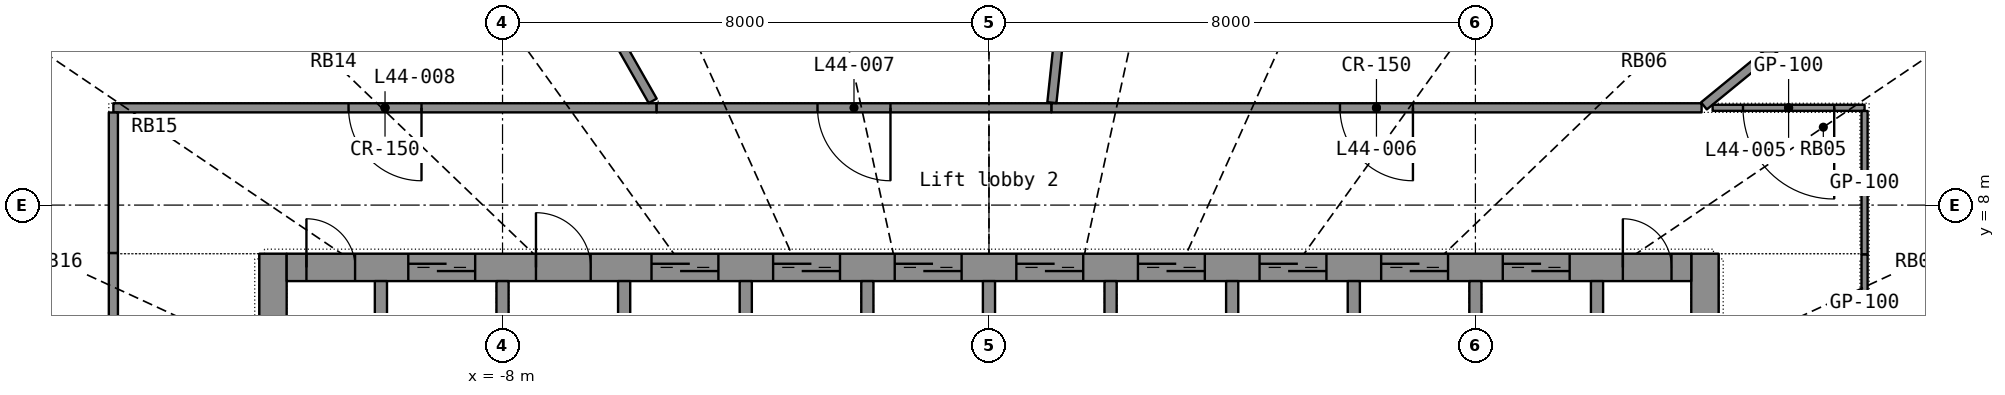
"""IFC4 building model, lengths in metres.
Left out: names, types, materials, properties, quantities, classifications, styles, units other than length and angle.
Written with IfcOpenShell. Run it as: python <this file> out.ifc"""

import sys

from ifc_helpers import new_model, si_unit, direction, frame, frame_2d, origin, place, context, subcontext, project, spatial, rectangle, extrude, element, fill, save


model = new_model("IFC4")
c1 = context("Model", 3, precision=1e-05, world=origin(), true_north=direction((0.0, 1.0)))
c2 = subcontext(c1, "Body", "Model", "MODEL_VIEW")
j1 = project(units=[si_unit("LENGTHUNIT", "METRE"), si_unit("PLANEANGLEUNIT", "RADIAN")], contexts=[c1])
p1 = place(None, origin())
s1 = spatial("IfcSite", under=j1, at=p1, CompositionType="ELEMENT")
p2 = place(p1, origin())
s2 = spatial("IfcBuilding", under=s1, at=p2, CompositionType="ELEMENT")
p3 = place(p2, frame((0.0, 0.0, 183.0)))
s3 = spatial("IfcBuildingStorey", under=s2, at=p3, CompositionType="ELEMENT", Elevation=183.0)
p4 = place(p3, frame((-11.775, -7.2, 0.0), z_axis=(0.0, 0.0, 1.0), x_axis=(0.0, 1.0, 0.0)))
e1 = element("IfcWall", 1, at=p4, inside=s3, PredefinedType="SHEAR", context=c2, shape_type="SweptSolid", body=[
    extrude(rectangle(XDim=14.4, YDim=0.45, at=frame_2d((7.2, 0.0))), origin(), (0.0, 0.0, 1.0), 3.3),
])
p5 = place(p4, frame((6.5, 0.0, 0.0)))
e2 = element("IfcOpeningElement", 2, at=p5, cuts=e1, PredefinedType="OPENING", context=c2, shape_type="SweptSolid", body=[
    extrude(rectangle(XDim=1.4, YDim=2.2, at=frame_2d((0.7, 1.1))), frame((0.0, 0.235, 0.0), z_axis=(0.0, -1.0, 0.0), x_axis=(1.0, 0.0, 0.0)), (0.0, 0.0, 1.0), 0.47),
])
p6 = place(p3, frame((11.775, -7.2, 0.0), z_axis=(0.0, 0.0, 1.0), x_axis=(0.0, 1.0, 0.0)))
e3 = element("IfcWall", 3, at=p6, inside=s3, PredefinedType="SHEAR", context=c2, shape_type="SweptSolid", body=[
    extrude(rectangle(XDim=14.4, YDim=0.45, at=frame_2d((7.2, 0.0))), origin(), (0.0, 0.0, 1.0), 3.3),
])
p7 = place(p6, frame((6.5, 0.0, 0.0)))
e4 = element("IfcOpeningElement", 4, at=p7, cuts=e3, PredefinedType="OPENING", context=c2, shape_type="SweptSolid", body=[
    extrude(rectangle(XDim=1.4, YDim=2.2, at=frame_2d((0.7, 1.1))), frame((0.0, 0.235, 0.0), z_axis=(0.0, -1.0, 0.0), x_axis=(1.0, 0.0, 0.0)), (0.0, 0.0, 1.0), 0.47),
])
p8 = place(p3, frame((-11.55, 6.975, 0.0), z_axis=(0.0, 0.0, 1.0), x_axis=(1.0, 0.0, 0.0)))
e5 = element("IfcWall", 5, at=p8, inside=s3, PredefinedType="SHEAR", context=c2, shape_type="SweptSolid", body=[
    extrude(rectangle(XDim=23.1, YDim=0.45, at=frame_2d((11.55, 0.0))), origin(), (0.0, 0.0, 1.0), 3.3),
])
p9 = place(p8, frame((2.0, 0.0, 0.0)))
e6 = element("IfcOpeningElement", 6, at=p9, cuts=e5, PredefinedType="OPENING", context=c2, shape_type="SweptSolid", body=[
    extrude(rectangle(XDim=1.1, YDim=2.2, at=frame_2d((0.55, 1.1))), frame((0.0, 0.235, 0.0), z_axis=(0.0, -1.0, 0.0), x_axis=(1.0, 0.0, 0.0)), (0.0, 0.0, 1.0), 0.47),
])
p10 = place(p8, frame((6.0, 0.0, 0.0)))
e7 = element("IfcOpeningElement", 7, at=p10, cuts=e5, PredefinedType="OPENING", context=c2, shape_type="SweptSolid", body=[
    extrude(rectangle(XDim=1.1, YDim=2.2, at=frame_2d((0.55, 1.1))), frame((0.0, 0.235, 0.0), z_axis=(0.0, -1.0, 0.0), x_axis=(1.0, 0.0, 0.0)), (0.0, 0.0, 1.0), 0.47),
])
p11 = place(p8, frame((8.0, 0.0, 0.0)))
e8 = element("IfcOpeningElement", 8, at=p11, cuts=e5, PredefinedType="OPENING", context=c2, shape_type="SweptSolid", body=[
    extrude(rectangle(XDim=1.1, YDim=2.2, at=frame_2d((0.55, 1.1))), frame((0.0, 0.235, 0.0), z_axis=(0.0, -1.0, 0.0), x_axis=(1.0, 0.0, 0.0)), (0.0, 0.0, 1.0), 0.47),
])
p12 = place(p8, frame((10.0, 0.0, 0.0)))
e9 = element("IfcOpeningElement", 9, at=p12, cuts=e5, PredefinedType="OPENING", context=c2, shape_type="SweptSolid", body=[
    extrude(rectangle(XDim=1.1, YDim=2.2, at=frame_2d((0.55, 1.1))), frame((0.0, 0.235, 0.0), z_axis=(0.0, -1.0, 0.0), x_axis=(1.0, 0.0, 0.0)), (0.0, 0.0, 1.0), 0.47),
])
p13 = place(p8, frame((12.0, 0.0, 0.0)))
e10 = element("IfcOpeningElement", 10, at=p13, cuts=e5, PredefinedType="OPENING", context=c2, shape_type="SweptSolid", body=[
    extrude(rectangle(XDim=1.1, YDim=2.2, at=frame_2d((0.55, 1.1))), frame((0.0, 0.235, 0.0), z_axis=(0.0, -1.0, 0.0), x_axis=(1.0, 0.0, 0.0)), (0.0, 0.0, 1.0), 0.47),
])
p14 = place(p8, frame((14.0, 0.0, 0.0)))
e11 = element("IfcOpeningElement", 11, at=p14, cuts=e5, PredefinedType="OPENING", context=c2, shape_type="SweptSolid", body=[
    extrude(rectangle(XDim=1.1, YDim=2.2, at=frame_2d((0.55, 1.1))), frame((0.0, 0.235, 0.0), z_axis=(0.0, -1.0, 0.0), x_axis=(1.0, 0.0, 0.0)), (0.0, 0.0, 1.0), 0.47),
])
p15 = place(p8, frame((16.0, 0.0, 0.0)))
e12 = element("IfcOpeningElement", 12, at=p15, cuts=e5, PredefinedType="OPENING", context=c2, shape_type="SweptSolid", body=[
    extrude(rectangle(XDim=1.1, YDim=2.2, at=frame_2d((0.55, 1.1))), frame((0.0, 0.235, 0.0), z_axis=(0.0, -1.0, 0.0), x_axis=(1.0, 0.0, 0.0)), (0.0, 0.0, 1.0), 0.47),
])
p16 = place(p8, frame((18.0, 0.0, 0.0)))
e13 = element("IfcOpeningElement", 13, at=p16, cuts=e5, PredefinedType="OPENING", context=c2, shape_type="SweptSolid", body=[
    extrude(rectangle(XDim=1.1, YDim=2.2, at=frame_2d((0.55, 1.1))), frame((0.0, 0.235, 0.0), z_axis=(0.0, -1.0, 0.0), x_axis=(1.0, 0.0, 0.0)), (0.0, 0.0, 1.0), 0.47),
])
p17 = place(p8, frame((20.0, 0.0, 0.0)))
e14 = element("IfcOpeningElement", 14, at=p17, cuts=e5, PredefinedType="OPENING", context=c2, shape_type="SweptSolid", body=[
    extrude(rectangle(XDim=1.1, YDim=2.2, at=frame_2d((0.55, 1.1))), frame((0.0, 0.235, 0.0), z_axis=(0.0, -1.0, 0.0), x_axis=(1.0, 0.0, 0.0)), (0.0, 0.0, 1.0), 0.47),
])
p18 = place(p8, frame((4.1, 0.0, 0.0)))
e15 = element("IfcOpeningElement", 15, at=p18, cuts=e5, PredefinedType="OPENING", context=c2, shape_type="SweptSolid", body=[
    extrude(rectangle(XDim=0.9, YDim=2.1, at=frame_2d((0.45, 1.05))), frame((0.0, 0.235, 0.0), z_axis=(0.0, -1.0, 0.0), x_axis=(1.0, 0.0, 0.0)), (0.0, 0.0, 1.0), 0.47),
])
p19 = place(p8, frame((0.325, 0.0, 0.0)))
e16 = element("IfcOpeningElement", 16, at=p19, cuts=e5, PredefinedType="OPENING", context=c2, shape_type="SweptSolid", body=[
    extrude(rectangle(XDim=0.8, YDim=2.05, at=frame_2d((0.4, 1.025))), frame((0.0, 0.235, 0.0), z_axis=(0.0, -1.0, 0.0), x_axis=(1.0, 0.0, 0.0)), (0.0, 0.0, 1.0), 0.47),
])
p20 = place(p8, frame((21.975, 0.0, 0.0)))
e17 = element("IfcOpeningElement", 17, at=p20, cuts=e5, PredefinedType="OPENING", context=c2, shape_type="SweptSolid", body=[
    extrude(rectangle(XDim=0.8, YDim=2.05, at=frame_2d((0.4, 1.025))), frame((0.0, 0.235, 0.0), z_axis=(0.0, -1.0, 0.0), x_axis=(1.0, 0.0, 0.0)), (0.0, 0.0, 1.0), 0.47),
])
for number, where, z_axis, x_axis in (
    (18, (-10.0, 3.9, 0.0), (0.0, 0.0, 1.0), (0.0, 1.0, 0.0)),
    (19, (-8.0, 3.9, 0.0), (0.0, 0.0, 1.0), (0.0, 1.0, 0.0)),
    (20, (-6.0, 3.9, 0.0), (0.0, 0.0, 1.0), (0.0, 1.0, 0.0)),
    (21, (-4.0, 3.9, 0.0), (0.0, 0.0, 1.0), (0.0, 1.0, 0.0)),
    (22, (-2.0, 3.9, 0.0), (0.0, 0.0, 1.0), (0.0, 1.0, 0.0)),
    (23, (0.0, 3.9, 0.0), (0.0, 0.0, 1.0), (0.0, 1.0, 0.0)),
    (24, (2.0, 3.9, 0.0), (0.0, 0.0, 1.0), (0.0, 1.0, 0.0)),
    (25, (4.0, 3.9, 0.0), (0.0, 0.0, 1.0), (0.0, 1.0, 0.0)),
    (26, (6.0, 3.9, 0.0), (0.0, 0.0, 1.0), (0.0, 1.0, 0.0)),
    (27, (8.0, 3.9, 0.0), (0.0, 0.0, 1.0), (0.0, 1.0, 0.0)),
    (28, (10.0, 3.9, 0.0), (0.0, 0.0, 1.0), (0.0, 1.0, 0.0)),
):
    element("IfcWall", number, at=place(p3, frame(where, z_axis=z_axis, x_axis=x_axis)), inside=s3, PredefinedType="SHEAR", context=c2, shape_type="SweptSolid", body=[
        extrude(rectangle(XDim=2.85, YDim=0.2, at=frame_2d((1.425, 0.0))), origin(), (0.0, 0.0, 1.0), 3.3),
    ])
p21 = place(p3, frame((11.72, 9.6, 0.0), z_axis=(0.0, 0.0, 1.0), x_axis=(-1.0, 0.0, 0.0)))
e29 = element("IfcWall", 29, at=p21, inside=s3, PredefinedType="PARTITIONING", context=c2, shape_type="SweptSolid", body=[
    extrude(rectangle(XDim=10.695, YDim=0.15, at=frame_2d((5.347, 0.0))), origin(), (0.0, 0.0, 1.0), 2.4),
])
p22 = place(p21, frame((4.747, 0.0, 0.0)))
e30 = element("IfcOpeningElement", 30, at=p22, cuts=e29, PredefinedType="OPENING", context=c2, shape_type="SweptSolid", body=[
    extrude(rectangle(XDim=1.2, YDim=2.2, at=frame_2d((0.6, 1.1))), frame((0.0, 0.085, 0.0), z_axis=(0.0, -1.0, 0.0), x_axis=(1.0, 0.0, 0.0)), (0.0, 0.0, 1.0), 0.17),
])
p23 = place(p3, frame((2.004, 18.766, 0.0), z_axis=(0.0, 0.0, 1.0), x_axis=(-0.106208417, -0.99434389, 0.0)))
e31 = element("IfcWall", 31, at=p23, inside=s3, PredefinedType="PARTITIONING", context=c2, shape_type="SweptSolid", body=[
    extrude(rectangle(XDim=9.133, YDim=0.15, at=frame_2d((4.566, 0.0))), origin(), (0.0, 0.0, 1.0), 2.4),
])
p24 = place(p3, frame((-5.465, 9.6, 0.0), z_axis=(0.0, 0.0, 1.0), x_axis=(-1.0, 0.0, 0.0)))
e32 = element("IfcWall", 32, at=p24, inside=s3, PredefinedType="PARTITIONING", context=c2, shape_type="SweptSolid", body=[
    extrude(rectangle(XDim=8.935, YDim=0.15, at=frame_2d((4.467, 0.0))), origin(), (0.0, 0.0, 1.0), 2.4),
])
p25 = place(p24, frame((3.867, 0.0, 0.0)))
e33 = element("IfcOpeningElement", 33, at=p25, cuts=e32, PredefinedType="OPENING", context=c2, shape_type="SweptSolid", body=[
    extrude(rectangle(XDim=1.2, YDim=2.2, at=frame_2d((0.6, 1.1))), frame((0.0, 0.085, 0.0), z_axis=(0.0, -1.0, 0.0), x_axis=(1.0, 0.0, 0.0)), (0.0, 0.0, 1.0), 0.17),
])
p26 = place(p3, frame((-9.722, 17.077, 0.0), z_axis=(0.0, 0.0, 1.0), x_axis=(0.494732537, -0.86904529, 0.0)))
e34 = element("IfcWall", 34, at=p26, inside=s3, PredefinedType="PARTITIONING", context=c2, shape_type="SweptSolid", body=[
    extrude(rectangle(XDim=8.473, YDim=0.15, at=frame_2d((4.236, 0.0))), origin(), (0.0, 0.0, 1.0), 2.4),
])
p27 = place(p3, frame((20.862, 7.969, 0.0), z_axis=(0.0, 0.0, 1.0), x_axis=(-0.934170905, -0.356825897, 0.0)))
e35 = element("IfcWall", 35, at=p27, inside=s3, PredefinedType="PARTITIONING", context=c2, shape_type="SweptSolid", body=[
    extrude(rectangle(XDim=6.917, YDim=0.15, at=frame_2d((3.458, 0.0))), origin(), (0.0, 0.0, 1.0), 2.4),
])
p28 = place(p3, frame((1.025, 9.6, 0.0), z_axis=(0.0, 0.0, 1.0), x_axis=(-1.0, 0.0, 0.0)))
e36 = element("IfcWall", 36, at=p28, inside=s3, PredefinedType="PARTITIONING", context=c2, shape_type="SweptSolid", body=[
    extrude(rectangle(XDim=6.49, YDim=0.15, at=frame_2d((3.245, 0.0))), origin(), (0.0, 0.0, 1.0), 2.4),
])
p29 = place(p28, frame((2.645, 0.0, 0.0)))
e37 = element("IfcOpeningElement", 37, at=p29, cuts=e36, PredefinedType="OPENING", context=c2, shape_type="SweptSolid", body=[
    extrude(rectangle(XDim=1.2, YDim=2.2, at=frame_2d((0.6, 1.1))), frame((0.0, 0.085, 0.0), z_axis=(0.0, -1.0, 0.0), x_axis=(1.0, 0.0, 0.0)), (0.0, 0.0, 1.0), 0.17),
])
p30 = place(p3, frame((16.27, 13.327, 0.0), z_axis=(0.0, 0.0, 1.0), x_axis=(-0.773587881, -0.633689033, 0.0)))
e38 = element("IfcWall", 38, at=p30, inside=s3, PredefinedType="PARTITIONING", context=c2, shape_type="SweptSolid", body=[
    extrude(rectangle(XDim=5.832, YDim=0.15, at=frame_2d((2.916, 0.0))), origin(), (0.0, 0.0, 1.0), 2.4),
])
p31 = place(p3, frame((-14.4, 7.212, 0.0), z_axis=(0.0, 0.0, 1.0), x_axis=(0.0, -1.0, 0.0)))
e39 = element("IfcWall", 39, at=p31, inside=s3, PredefinedType="PARTITIONING", context=c2, shape_type="SweptSolid", body=[
    extrude(rectangle(XDim=5.635, YDim=0.15, at=frame_2d((2.817, 0.0))), origin(), (0.0, 0.0, 1.0), 2.4),
])
p32 = place(p3, frame((14.4, 9.6, 0.0), z_axis=(0.0, 0.0, 1.0), x_axis=(-1.0, 0.0, 0.0)))
e40 = element("IfcWall", 40, at=p32, inside=s3, PredefinedType="PARTITIONING", context=c2, shape_type="SweptSolid", body=[
    extrude(rectangle(XDim=2.499, YDim=0.1, at=frame_2d((1.249, 0.0))), origin(), (0.0, 0.0, 1.0), 2.4),
])
p33 = place(p32, frame((0.499, 0.0, 0.0)))
e41 = element("IfcOpeningElement", 41, at=p33, cuts=e40, PredefinedType="OPENING", context=c2, shape_type="SweptSolid", body=[
    extrude(rectangle(XDim=1.5, YDim=2.4, at=frame_2d((0.75, 1.2))), frame((0.0, 0.06, 0.0), z_axis=(0.0, -1.0, 0.0), x_axis=(1.0, 0.0, 0.0)), (0.0, 0.0, 1.0), 0.12),
])
p34 = place(p3, frame((-14.4, 9.523, 0.0), z_axis=(0.0, 0.0, 1.0), x_axis=(0.0, -1.0, 0.0)))
e42 = element("IfcWall", 42, at=p34, inside=s3, PredefinedType="PARTITIONING", context=c2, shape_type="SweptSolid", body=[
    extrude(rectangle(XDim=2.31, YDim=0.15, at=frame_2d((1.155, 0.0))), origin(), (0.0, 0.0, 1.0), 2.4),
])
p35 = place(p3, frame((14.4, 7.188, 0.0), z_axis=(0.0, 0.0, 1.0), x_axis=(0.0, 1.0, 0.0)))
e43 = element("IfcWall", 43, at=p35, inside=s3, PredefinedType="PARTITIONING", context=c2, shape_type="SweptSolid", body=[
    extrude(rectangle(XDim=2.36, YDim=0.1, at=frame_2d((1.18, 0.0))), origin(), (0.0, 0.0, 1.0), 2.4),
])
p36 = place(p3, frame((14.4, 5.602, 0.0), z_axis=(0.0, 0.0, 1.0), x_axis=(0.0, 1.0, 0.0)))
e44 = element("IfcWall", 44, at=p36, inside=s3, PredefinedType="PARTITIONING", context=c2, shape_type="SweptSolid", body=[
    extrude(rectangle(XDim=1.585, YDim=0.1, at=frame_2d((0.793, 0.0))), origin(), (0.0, 0.0, 1.0), 2.4),
])
p37 = place(p9, origin())
e45 = element("IfcDoor", 45, at=p37, inside=s3, OperationType="DOUBLE_DOOR_SLIDING", PredefinedType="DOOR", context=c2, shape_type="SweptSolid", body=[
    extrude(rectangle(XDim=1.1, YDim=2.2, at=frame_2d((0.55, 1.1))), frame((0.0, 0.025, 0.0), z_axis=(0.0, -1.0, 0.0), x_axis=(1.0, 0.0, 0.0)), (0.0, 0.0, 1.0), 0.05),
])
fill(e6, e45)
p38 = place(p10, origin())
e46 = element("IfcDoor", 46, at=p38, inside=s3, OperationType="DOUBLE_DOOR_SLIDING", PredefinedType="DOOR", context=c2, shape_type="SweptSolid", body=[
    extrude(rectangle(XDim=1.1, YDim=2.2, at=frame_2d((0.55, 1.1))), frame((0.0, 0.025, 0.0), z_axis=(0.0, -1.0, 0.0), x_axis=(1.0, 0.0, 0.0)), (0.0, 0.0, 1.0), 0.05),
])
fill(e7, e46)
p39 = place(p11, origin())
e47 = element("IfcDoor", 47, at=p39, inside=s3, OperationType="DOUBLE_DOOR_SLIDING", PredefinedType="DOOR", context=c2, shape_type="SweptSolid", body=[
    extrude(rectangle(XDim=1.1, YDim=2.2, at=frame_2d((0.55, 1.1))), frame((0.0, 0.025, 0.0), z_axis=(0.0, -1.0, 0.0), x_axis=(1.0, 0.0, 0.0)), (0.0, 0.0, 1.0), 0.05),
])
fill(e8, e47)
p40 = place(p12, origin())
e48 = element("IfcDoor", 48, at=p40, inside=s3, OperationType="DOUBLE_DOOR_SLIDING", PredefinedType="DOOR", context=c2, shape_type="SweptSolid", body=[
    extrude(rectangle(XDim=1.1, YDim=2.2, at=frame_2d((0.55, 1.1))), frame((0.0, 0.025, 0.0), z_axis=(0.0, -1.0, 0.0), x_axis=(1.0, 0.0, 0.0)), (0.0, 0.0, 1.0), 0.05),
])
fill(e9, e48)
p41 = place(p13, origin())
e49 = element("IfcDoor", 49, at=p41, inside=s3, OperationType="DOUBLE_DOOR_SLIDING", PredefinedType="DOOR", context=c2, shape_type="SweptSolid", body=[
    extrude(rectangle(XDim=1.1, YDim=2.2, at=frame_2d((0.55, 1.1))), frame((0.0, 0.025, 0.0), z_axis=(0.0, -1.0, 0.0), x_axis=(1.0, 0.0, 0.0)), (0.0, 0.0, 1.0), 0.05),
])
fill(e10, e49)
p42 = place(p14, origin())
e50 = element("IfcDoor", 50, at=p42, inside=s3, OperationType="DOUBLE_DOOR_SLIDING", PredefinedType="DOOR", context=c2, shape_type="SweptSolid", body=[
    extrude(rectangle(XDim=1.1, YDim=2.2, at=frame_2d((0.55, 1.1))), frame((0.0, 0.025, 0.0), z_axis=(0.0, -1.0, 0.0), x_axis=(1.0, 0.0, 0.0)), (0.0, 0.0, 1.0), 0.05),
])
fill(e11, e50)
p43 = place(p15, origin())
e51 = element("IfcDoor", 51, at=p43, inside=s3, OperationType="DOUBLE_DOOR_SLIDING", PredefinedType="DOOR", context=c2, shape_type="SweptSolid", body=[
    extrude(rectangle(XDim=1.1, YDim=2.2, at=frame_2d((0.55, 1.1))), frame((0.0, 0.025, 0.0), z_axis=(0.0, -1.0, 0.0), x_axis=(1.0, 0.0, 0.0)), (0.0, 0.0, 1.0), 0.05),
])
fill(e12, e51)
p44 = place(p16, origin())
e52 = element("IfcDoor", 52, at=p44, inside=s3, OperationType="DOUBLE_DOOR_SLIDING", PredefinedType="DOOR", context=c2, shape_type="SweptSolid", body=[
    extrude(rectangle(XDim=1.1, YDim=2.2, at=frame_2d((0.55, 1.1))), frame((0.0, 0.025, 0.0), z_axis=(0.0, -1.0, 0.0), x_axis=(1.0, 0.0, 0.0)), (0.0, 0.0, 1.0), 0.05),
])
fill(e13, e52)
p45 = place(p17, origin())
e53 = element("IfcDoor", 53, at=p45, inside=s3, OperationType="DOUBLE_DOOR_SLIDING", PredefinedType="DOOR", context=c2, shape_type="SweptSolid", body=[
    extrude(rectangle(XDim=1.1, YDim=2.2, at=frame_2d((0.55, 1.1))), frame((0.0, 0.025, 0.0), z_axis=(0.0, -1.0, 0.0), x_axis=(1.0, 0.0, 0.0)), (0.0, 0.0, 1.0), 0.05),
])
fill(e14, e53)
p46 = place(p18, origin())
e54 = element("IfcDoor", 54, at=p46, inside=s3, OperationType="SINGLE_SWING_LEFT", PredefinedType="DOOR", context=c2, shape_type="SweptSolid", body=[
    extrude(rectangle(XDim=0.9, YDim=2.1, at=frame_2d((0.45, 1.05))), frame((0.0, 0.025, 0.0), z_axis=(0.0, -1.0, 0.0), x_axis=(1.0, 0.0, 0.0)), (0.0, 0.0, 1.0), 0.05),
])
fill(e15, e54)
p47 = place(p19, origin())
e55 = element("IfcDoor", 55, at=p47, inside=s3, OperationType="SINGLE_SWING_LEFT", PredefinedType="DOOR", context=c2, shape_type="SweptSolid", body=[
    extrude(rectangle(XDim=0.8, YDim=2.05, at=frame_2d((0.4, 1.025))), frame((0.0, 0.025, 0.0), z_axis=(0.0, -1.0, 0.0), x_axis=(1.0, 0.0, 0.0)), (0.0, 0.0, 1.0), 0.05),
])
fill(e16, e55)
p48 = place(p20, origin())
e56 = element("IfcDoor", 56, at=p48, inside=s3, OperationType="SINGLE_SWING_LEFT", PredefinedType="DOOR", context=c2, shape_type="SweptSolid", body=[
    extrude(rectangle(XDim=0.8, YDim=2.05, at=frame_2d((0.4, 1.025))), frame((0.0, 0.025, 0.0), z_axis=(0.0, -1.0, 0.0), x_axis=(1.0, 0.0, 0.0)), (0.0, 0.0, 1.0), 0.05),
])
fill(e17, e56)
p49 = place(p33, origin())
e57 = element("IfcDoor", 57, at=p49, inside=s3, OperationType="DOUBLE_DOOR_SINGLE_SWING", PredefinedType="DOOR", context=c2, shape_type="SweptSolid", body=[
    extrude(rectangle(XDim=1.5, YDim=2.4, at=frame_2d((0.75, 1.2))), frame((0.0, 0.025, 0.0), z_axis=(0.0, -1.0, 0.0), x_axis=(1.0, 0.0, 0.0)), (0.0, 0.0, 1.0), 0.05),
])
fill(e41, e57)
p50 = place(p22, origin())
e58 = element("IfcDoor", 58, at=p50, inside=s3, OperationType="DOUBLE_DOOR_SINGLE_SWING", PredefinedType="DOOR", context=c2, shape_type="SweptSolid", body=[
    extrude(rectangle(XDim=1.2, YDim=2.2, at=frame_2d((0.6, 1.1))), frame((0.0, 0.025, 0.0), z_axis=(0.0, -1.0, 0.0), x_axis=(1.0, 0.0, 0.0)), (0.0, 0.0, 1.0), 0.05),
])
fill(e30, e58)
p51 = place(p29, origin())
e59 = element("IfcDoor", 59, at=p51, inside=s3, OperationType="DOUBLE_DOOR_SINGLE_SWING", PredefinedType="DOOR", context=c2, shape_type="SweptSolid", body=[
    extrude(rectangle(XDim=1.2, YDim=2.2, at=frame_2d((0.6, 1.1))), frame((0.0, 0.025, 0.0), z_axis=(0.0, -1.0, 0.0), x_axis=(1.0, 0.0, 0.0)), (0.0, 0.0, 1.0), 0.05),
])
fill(e37, e59)
p52 = place(p25, origin())
e60 = element("IfcDoor", 60, at=p52, inside=s3, OperationType="DOUBLE_DOOR_SINGLE_SWING", PredefinedType="DOOR", context=c2, shape_type="SweptSolid", body=[
    extrude(rectangle(XDim=1.2, YDim=2.2, at=frame_2d((0.6, 1.1))), frame((0.0, 0.025, 0.0), z_axis=(0.0, -1.0, 0.0), x_axis=(1.0, 0.0, 0.0)), (0.0, 0.0, 1.0), 0.05),
])
fill(e33, e60)
save(model, sys.argv[1])
